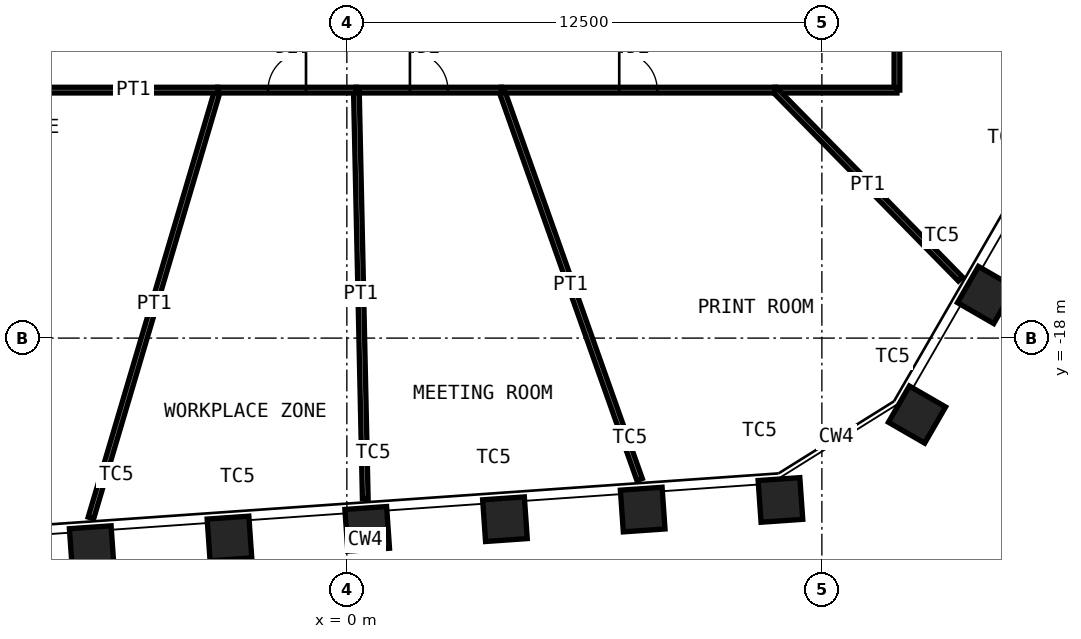
"""IFC4 building model, lengths in metres.
Left out: names, types, materials, properties, quantities, classifications, styles, units other than length and angle.
Written with IfcOpenShell. Run it as: python <this file> out.ifc"""

import sys

from ifc_helpers import new_model, si_unit, direction, frame, frame_2d, origin, origin_2d, place, context, subcontext, project, spatial, rectangle, hollow_rectangle, extrude, element, fill, save


model = new_model("IFC4")
c1 = context("Model", 3, precision=1e-05, world=origin(), true_north=direction((0.0, 1.0)))
c2 = subcontext(c1, "Body", "Model", "MODEL_VIEW")
j1 = project(units=[si_unit("LENGTHUNIT", "METRE"), si_unit("PLANEANGLEUNIT", "RADIAN")], contexts=[c1])
p1 = place(None, origin())
s1 = spatial("IfcSite", under=j1, at=p1, CompositionType="ELEMENT")
p2 = place(p1, origin())
s2 = spatial("IfcBuilding", under=s1, at=p2, CompositionType="ELEMENT")
p3 = place(p2, frame((0.0, 0.0, 205.6)))
s3 = spatial("IfcBuildingStorey", under=s2, at=p3, CompositionType="ELEMENT", Elevation=205.6)
for number, where, z_axis, x_axis in (
    (1, (16.821, -16.866, 0.0), (0.0, 0.0, 1.0), (0.5, 0.866, 0.0)),
    (2, (15.004, -20.012, 0.0), (0.0, 0.0, 1.0), (0.5, 0.866, 0.0)),
    (3, (11.41, -22.258, 0.0), (0.0, 0.0, 1.0), (0.998, 0.07, 0.0)),
    (4, (7.785, -22.512, 0.0), (0.0, 0.0, 1.0), (0.998, 0.07, 0.0)),
    (5, (4.16, -22.765, 0.0), (0.0, 0.0, 1.0), (0.998, 0.07, 0.0)),
    (6, (0.536, -23.019, 0.0), (0.0, 0.0, 1.0), (0.998, 0.07, 0.0)),
    (7, (-3.089, -23.272, 0.0), (0.0, 0.0, 1.0), (0.998, 0.07, 0.0)),
    (8, (-6.714, -23.526, 0.0), (0.0, 0.0, 1.0), (0.998, 0.07, 0.0)),
):
    element("IfcColumn", number, at=place(p3, frame(where, z_axis=z_axis, x_axis=x_axis)), inside=s3, PredefinedType="COLUMN", context=c2, shape_type="SweptSolid", body=[
        extrude(hollow_rectangle(XDim=1.1, YDim=1.1, WallThickness=0.07, at=origin_2d()), origin(), (0.0, 0.0, 1.0), 4.2),
    ])
p4 = place(p3, frame((-6.734, -22.731, 0.0), z_axis=(0.0, 0.0, 1.0), x_axis=(0.284049386564, 0.958809650553, 0.0)))
e9 = element("IfcWall", 9, at=p4, inside=s3, PredefinedType="PARTITIONING", context=c2, shape_type="SweptSolid", body=[
    extrude(rectangle(XDim=11.74, YDim=0.15, at=frame_2d((5.87, 0.0))), origin(), (0.0, 0.0, 1.0), 3.33),
])
p5 = place(p3, frame((-3.399, -11.475, 0.0), z_axis=(0.0, 0.0, 1.0), x_axis=(-1.0, 0.0, 0.0)))
e10 = element("IfcWall", 10, at=p5, inside=s3, PredefinedType="PARTITIONING", context=c2, shape_type="SweptSolid", body=[
    extrude(rectangle(XDim=11.076, YDim=0.15, at=frame_2d((5.538, 0.0))), origin(), (0.0, 0.0, 1.0), 4.03),
])
p6 = place(p5, frame((4.638, 0.0, 0.0)))
e11 = element("IfcOpeningElement", 11, at=p6, cuts=e10, PredefinedType="OPENING", context=c2, shape_type="SweptSolid", body=[
    extrude(rectangle(XDim=1.8, YDim=2.4, at=frame_2d((0.9, 1.2))), frame((0.0, 0.085, 0.0), z_axis=(0.0, -1.0, 0.0), x_axis=(1.0, 0.0, 0.0)), (0.0, 0.0, 1.0), 0.17),
])
p7 = place(p3, frame((14.475, -4.727, 0.0), z_axis=(0.0, 0.0, 1.0), x_axis=(0.0, -1.0, 0.0)))
e12 = element("IfcWall", 12, at=p7, inside=s3, PredefinedType="PARTITIONING", context=c2, shape_type="SweptSolid", body=[
    extrude(rectangle(XDim=6.748, YDim=0.15, at=frame_2d((3.374, 0.0))), origin(), (0.0, 0.0, 1.0), 4.03),
])
p8 = place(p7, frame((2.474, 0.0, 0.0)))
e13 = element("IfcOpeningElement", 13, at=p8, cuts=e12, PredefinedType="OPENING", context=c2, shape_type="SweptSolid", body=[
    extrude(rectangle(XDim=1.8, YDim=2.4, at=frame_2d((0.9, 1.2))), frame((0.0, 0.085, 0.0), z_axis=(0.0, -1.0, 0.0), x_axis=(1.0, 0.0, 0.0)), (0.0, 0.0, 1.0), 0.17),
])
p9 = place(p3, frame((14.475, -11.475, 0.0), z_axis=(0.0, 0.0, 1.0), x_axis=(-1.0, 0.0, 0.0)))
e14 = element("IfcWall", 14, at=p9, inside=s3, PredefinedType="PARTITIONING", context=c2, shape_type="SweptSolid", body=[
    extrude(rectangle(XDim=3.209, YDim=0.15, at=frame_2d((1.605, 0.0))), origin(), (0.0, 0.0, 1.0), 4.03),
])
p10 = place(p3, frame((16.145, -16.444, 0.0), z_axis=(0.0, 0.0, 1.0), x_axis=(-0.700591378209, 0.71356269576, 0.0)))
e15 = element("IfcWall", 15, at=p10, inside=s3, PredefinedType="PARTITIONING", context=c2, shape_type="SweptSolid", body=[
    extrude(rectangle(XDim=6.964, YDim=0.15, at=frame_2d((3.482, 0.0))), origin(), (0.0, 0.0, 1.0), 3.43),
])
p11 = place(p3, frame((11.266, -11.475, 0.0), z_axis=(0.0, 0.0, 1.0), x_axis=(-1.0, 0.0, 0.0)))
e16 = element("IfcWall", 16, at=p11, inside=s3, PredefinedType="PARTITIONING", context=c2, shape_type="SweptSolid", body=[
    extrude(rectangle(XDim=7.196, YDim=0.15, at=frame_2d((3.598, 0.0))), origin(), (0.0, 0.0, 1.0), 4.03),
])
p12 = place(p11, frame((3.098, 0.0, 0.0)))
e17 = element("IfcOpeningElement", 17, at=p12, cuts=e16, PredefinedType="OPENING", context=c2, shape_type="SweptSolid", body=[
    extrude(rectangle(XDim=1.0, YDim=2.4, at=frame_2d((0.5, 1.2))), frame((0.0, 0.085, 0.0), z_axis=(0.0, -1.0, 0.0), x_axis=(1.0, 0.0, 0.0)), (0.0, 0.0, 1.0), 0.17),
])
p13 = place(p3, frame((7.703, -21.719, 0.0), z_axis=(0.0, 0.0, 1.0), x_axis=(-0.334269551553, 0.942477515331, 0.0)))
e18 = element("IfcWall", 18, at=p13, inside=s3, PredefinedType="PARTITIONING", context=c2, shape_type="SweptSolid", body=[
    extrude(rectangle(XDim=10.869, YDim=0.15, at=frame_2d((5.435, 0.0))), origin(), (0.0, 0.0, 1.0), 3.43),
])
p14 = place(p3, frame((4.07, -11.475, 0.0), z_axis=(0.0, 0.0, 1.0), x_axis=(-1.0, 0.0, 0.0)))
e19 = element("IfcWall", 19, at=p14, inside=s3, PredefinedType="PARTITIONING", context=c2, shape_type="SweptSolid", body=[
    extrude(rectangle(XDim=3.819, YDim=0.15, at=frame_2d((1.91, 0.0))), origin(), (0.0, 0.0, 1.0), 4.03),
])
p15 = place(p14, frame((1.41, 0.0, 0.0)))
e20 = element("IfcOpeningElement", 20, at=p15, cuts=e19, PredefinedType="OPENING", context=c2, shape_type="SweptSolid", body=[
    extrude(rectangle(XDim=1.0, YDim=2.4, at=frame_2d((0.5, 1.2))), frame((0.0, 0.085, 0.0), z_axis=(0.0, -1.0, 0.0), x_axis=(1.0, 0.0, 0.0)), (0.0, 0.0, 1.0), 0.17),
])
p16 = place(p3, frame((0.485, -22.22, 0.0), z_axis=(0.0, 0.0, 1.0), x_axis=(-0.021806550804, 0.999762208899, 0.0)))
e21 = element("IfcWall", 21, at=p16, inside=s3, PredefinedType="PARTITIONING", context=c2, shape_type="SweptSolid", body=[
    extrude(rectangle(XDim=10.748, YDim=0.15, at=frame_2d((5.374, 0.0))), origin(), (0.0, 0.0, 1.0), 3.43),
])
p17 = place(p3, frame((0.25, -11.475, 0.0), z_axis=(0.0, 0.0, 1.0), x_axis=(-1.0, 0.0, 0.0)))
e22 = element("IfcWall", 22, at=p17, inside=s3, PredefinedType="PARTITIONING", context=c2, shape_type="SweptSolid", body=[
    extrude(rectangle(XDim=3.65, YDim=0.15, at=frame_2d((1.825, 0.0))), origin(), (0.0, 0.0, 1.0), 4.03),
])
p18 = place(p17, frame((1.325, 0.0, 0.0)))
e23 = element("IfcOpeningElement", 23, at=p18, cuts=e22, PredefinedType="OPENING", context=c2, shape_type="SweptSolid", body=[
    extrude(rectangle(XDim=1.0, YDim=2.4, at=frame_2d((0.5, 1.2))), frame((0.0, 0.085, 0.0), z_axis=(0.0, -1.0, 0.0), x_axis=(1.0, 0.0, 0.0)), (0.0, 0.0, 1.0), 0.17),
])
p19 = place(p12, origin())
e24 = element("IfcDoor", 24, at=p19, inside=s3, OperationType="SINGLE_SWING_RIGHT", PredefinedType="DOOR", context=c2, shape_type="SweptSolid", body=[
    extrude(rectangle(XDim=1.0, YDim=2.4, at=frame_2d((0.5, 1.2))), frame((0.0, 0.025, 0.0), z_axis=(0.0, -1.0, 0.0), x_axis=(1.0, 0.0, 0.0)), (0.0, 0.0, 1.0), 0.05),
])
fill(e17, e24)
p20 = place(p15, origin())
e25 = element("IfcDoor", 25, at=p20, inside=s3, OperationType="SINGLE_SWING_RIGHT", PredefinedType="DOOR", context=c2, shape_type="SweptSolid", body=[
    extrude(rectangle(XDim=1.0, YDim=2.4, at=frame_2d((0.5, 1.2))), frame((0.0, 0.025, 0.0), z_axis=(0.0, -1.0, 0.0), x_axis=(1.0, 0.0, 0.0)), (0.0, 0.0, 1.0), 0.05),
])
fill(e20, e25)
p21 = place(p18, origin())
e26 = element("IfcDoor", 26, at=p21, inside=s3, OperationType="SINGLE_SWING_LEFT", PredefinedType="DOOR", context=c2, shape_type="SweptSolid", body=[
    extrude(rectangle(XDim=1.0, YDim=2.4, at=frame_2d((0.5, 1.2))), frame((0.0, 0.025, 0.0), z_axis=(0.0, -1.0, 0.0), x_axis=(1.0, 0.0, 0.0)), (0.0, 0.0, 1.0), 0.05),
])
fill(e23, e26)
save(model, sys.argv[1])
